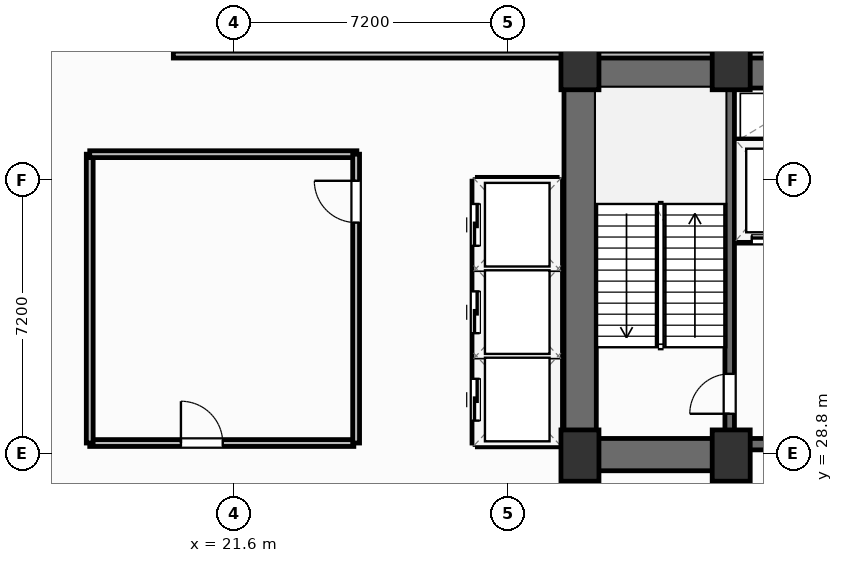
"""IFC4 building model, lengths in metres.
Left out: names, types, materials, properties, quantities, classifications, styles, units other than length and angle.
Written with IfcOpenShell. Run it as: python <this file> out.ifc"""

import sys

from ifc_helpers import new_model, si_unit, direction, frame, frame_2d, origin, origin_2d, place, context, subcontext, project, spatial, rectangle, extrude, element, fill, save


model = new_model("IFC4")
c1 = context("Model", 3, precision=1e-05, world=origin(), true_north=direction((0.0, 1.0)))
c2 = subcontext(c1, "Body", "Model", "MODEL_VIEW")
j1 = project(units=[si_unit("LENGTHUNIT", "METRE"), si_unit("PLANEANGLEUNIT", "RADIAN")], contexts=[c1])
p1 = place(None, origin())
s1 = spatial("IfcSite", under=j1, at=p1, CompositionType="ELEMENT")
p2 = place(p1, origin())
s2 = spatial("IfcBuilding", under=s1, at=p2, CompositionType="ELEMENT")
p3 = place(p2, frame((0.0, 0.0, 71.4)))
s3 = spatial("IfcBuildingStorey", under=s2, at=p3, CompositionType="ELEMENT", Elevation=71.4)
for number, where, z_axis, x_axis in (
    (1, (30.7, 28.75, 0.0), (0.0, 0.0, 1.0), (1.0, 0.0, 0.0)),
    (2, (34.68, 28.75, 0.0), (0.0, 0.0, 1.0), (1.0, 0.0, 0.0)),
    (3, (30.7, 39.05, 0.0), (0.0, 0.0, 1.0), (1.0, 0.0, 0.0)),
    (4, (34.68, 39.05, 0.0), (0.0, 0.0, 1.0), (1.0, 0.0, 0.0)),
):
    element("IfcColumn", number, at=place(p3, frame(where, z_axis=z_axis, x_axis=x_axis)), inside=s3, PredefinedType="COLUMN", context=c2, shape_type="SweptSolid", body=[
        extrude(rectangle(XDim=1.0, YDim=1.35, at=origin_2d()), origin(), (0.0, 0.0, 1.0), 4.8),
    ])
p4 = place(p3, frame((30.28, 38.845, 0.0), z_axis=(0.0, 0.0, 1.0), x_axis=(1.0, 0.0, 0.0)))
e5 = element("IfcWall", 5, at=p4, inside=s3, PredefinedType="SHEAR", context=c2, shape_type="SweptSolid", body=[
    extrude(rectangle(XDim=17.84, YDim=0.85, at=frame_2d((8.92, 0.0))), origin(), (0.0, 0.0, 1.0), 4.55),
])
p5 = place(p3, frame((30.705, 29.2, 0.0), z_axis=(0.0, 0.0, 1.0), x_axis=(0.0, 1.0, 0.0)))
e6 = element("IfcWall", 6, at=p5, inside=s3, PredefinedType="SHEAR", context=c2, shape_type="SweptSolid", body=[
    extrude(rectangle(XDim=9.22, YDim=0.85, at=frame_2d((4.61, 0.0))), origin(), (0.0, 0.0, 1.0), 4.55),
])
p6 = place(p3, frame((30.28, 28.775, 0.0), z_axis=(0.0, 0.0, 1.0), x_axis=(1.0, 0.0, 0.0)))
e7 = element("IfcWall", 7, at=p6, inside=s3, PredefinedType="SHEAR", context=c2, shape_type="SweptSolid", body=[
    extrude(rectangle(XDim=4.52, YDim=0.85, at=frame_2d((2.26, 0.0))), origin(), (0.0, 0.0, 1.0), 4.55),
])
p7 = place(p3, frame((34.8, 29.05, 0.0), z_axis=(0.0, 0.0, 1.0), x_axis=(1.0, 0.0, 0.0)))
e8 = element("IfcWall", 8, at=p7, inside=s3, PredefinedType="SHEAR", context=c2, shape_type="SweptSolid", body=[
    extrude(rectangle(XDim=8.8, YDim=0.3, at=frame_2d((4.4, 0.0))), origin(), (0.0, 0.0, 1.0), 4.55),
])
p8 = place(p7, frame((0.95, 0.0, 0.0)))
e9 = element("IfcOpeningElement", 9, at=p8, cuts=e8, PredefinedType="OPENING", context=c2, shape_type="SweptSolid", body=[
    extrude(rectangle(XDim=1.1, YDim=2.15, at=frame_2d((0.55, 1.075))), frame((0.0, 0.16, 0.0), z_axis=(0.0, -1.0, 0.0), x_axis=(1.0, 0.0, 0.0)), (0.0, 0.0, 1.0), 0.32),
])
p9 = place(p7, frame((6.75, 0.0, 0.0)))
e10 = element("IfcOpeningElement", 10, at=p9, cuts=e8, PredefinedType="OPENING", context=c2, shape_type="SweptSolid", body=[
    extrude(rectangle(XDim=1.1, YDim=2.15, at=frame_2d((0.55, 1.075))), frame((0.0, 0.16, 0.0), z_axis=(0.0, -1.0, 0.0), x_axis=(1.0, 0.0, 0.0)), (0.0, 0.0, 1.0), 0.32),
])
p10 = place(p7, frame((4.45, 0.0, 0.0)))
e11 = element("IfcOpeningElement", 11, at=p10, cuts=e8, PredefinedType="OPENING", context=c2, shape_type="SweptSolid", body=[
    extrude(rectangle(XDim=0.95, YDim=2.15, at=frame_2d((0.475, 1.075))), frame((0.0, 0.16, 0.0), z_axis=(0.0, -1.0, 0.0), x_axis=(1.0, 0.0, 0.0)), (0.0, 0.0, 1.0), 0.32),
])
p11 = place(p3, frame((34.64, 29.2, 0.0), z_axis=(0.0, 0.0, 1.0), x_axis=(0.0, 1.0, 0.0)))
e12 = element("IfcWall", 12, at=p11, inside=s3, PredefinedType="SHEAR", context=c2, shape_type="SweptSolid", body=[
    extrude(rectangle(XDim=9.22, YDim=0.25, at=frame_2d((4.61, 0.0))), origin(), (0.0, 0.0, 1.0), 4.55),
])
p12 = place(p11, frame((0.65, 0.0, 0.0)))
e13 = element("IfcOpeningElement", 13, at=p12, cuts=e12, PredefinedType="OPENING", context=c2, shape_type="SweptSolid", body=[
    extrude(rectangle(XDim=1.05, YDim=2.15, at=frame_2d((0.525, 1.075))), frame((0.0, 0.135, 0.0), z_axis=(0.0, -1.0, 0.0), x_axis=(1.0, 0.0, 0.0)), (0.0, 0.0, 1.0), 0.27),
])
p13 = place(p3, frame((18.646, 55.739, 0.0), z_axis=(0.0, 0.0, 1.0), x_axis=(0.935222250741, -0.354061211825, 0.0)))
e14 = element("IfcWall", 14, at=p13, inside=s3, PredefinedType="SOLIDWALL", context=c2, shape_type="SweptSolid", body=[
    extrude(rectangle(XDim=60.0, YDim=0.22, at=frame_2d((30.0, 0.0))), origin(), (0.0, 0.0, 1.0), 3.83),
])
p14 = place(p13, frame((27.647, 0.0, 0.0)))
e15 = element("IfcOpeningElement", 15, at=p14, cuts=e14, PredefinedType="OPENING", context=c2, shape_type="SweptSolid", body=[
    extrude(rectangle(XDim=1.85, YDim=2.3, at=frame_2d((0.925, 1.15))), frame((0.0, 0.12, 0.0), z_axis=(0.0, -1.0, 0.0), x_axis=(1.0, 0.0, 0.0)), (0.0, 0.0, 1.0), 0.24),
])
p15 = place(p13, frame((0.55, 0.0, 0.75)))
e16 = element("IfcOpeningElement", 16, at=p15, cuts=e14, PredefinedType="OPENING", context=c2, shape_type="SweptSolid", body=[
    extrude(rectangle(XDim=1.65, YDim=1.65, at=frame_2d((0.825, 0.825))), frame((0.0, 0.12, 0.0), z_axis=(0.0, -1.0, 0.0), x_axis=(1.0, 0.0, 0.0)), (0.0, 0.0, 1.0), 0.24),
])
p16 = place(p13, frame((57.8, 0.0, 0.75)))
e17 = element("IfcOpeningElement", 17, at=p16, cuts=e14, PredefinedType="OPENING", context=c2, shape_type="SweptSolid", body=[
    extrude(rectangle(XDim=1.65, YDim=1.65, at=frame_2d((0.825, 0.825))), frame((0.0, 0.12, 0.0), z_axis=(0.0, -1.0, 0.0), x_axis=(1.0, 0.0, 0.0)), (0.0, 0.0, 1.0), 0.24),
])
p17 = place(p3, frame((17.8, 29.08, 0.0), z_axis=(0.0, 0.0, 1.0), x_axis=(1.0, 0.0, 0.0)))
e18 = element("IfcWall", 18, at=p17, inside=s3, PredefinedType="PARTITIONING", context=c2, shape_type="SweptSolid", body=[
    extrude(rectangle(XDim=6.95, YDim=0.18, at=frame_2d((3.475, 0.0))), origin(), (0.0, 0.0, 1.0), 4.55),
])
p18 = place(p17, frame((2.4, 0.0, 0.0)))
e19 = element("IfcOpeningElement", 19, at=p18, cuts=e18, PredefinedType="OPENING", context=c2, shape_type="SweptSolid", body=[
    extrude(rectangle(XDim=1.1, YDim=2.15, at=frame_2d((0.55, 1.075))), frame((0.0, 0.1, 0.0), z_axis=(0.0, -1.0, 0.0), x_axis=(1.0, 0.0, 0.0)), (0.0, 0.0, 1.0), 0.2),
])
p19 = place(p3, frame((17.8, 29.08, 0.0), z_axis=(0.0, 0.0, 1.0), x_axis=(0.0, 1.0, 0.0)))
e20 = element("IfcWall", 20, at=p19, inside=s3, PredefinedType="PARTITIONING", context=c2, shape_type="SweptSolid", body=[
    extrude(rectangle(XDim=7.6, YDim=0.18, at=frame_2d((3.8, 0.0))), origin(), (0.0, 0.0, 1.0), 4.55),
])
p20 = place(p3, frame((17.8, 36.68, 0.0), z_axis=(0.0, 0.0, 1.0), x_axis=(1.0, 0.0, 0.0)))
e21 = element("IfcWall", 21, at=p20, inside=s3, PredefinedType="PARTITIONING", context=c2, shape_type="SweptSolid", body=[
    extrude(rectangle(XDim=7.03, YDim=0.18, at=frame_2d((3.515, 0.0))), origin(), (0.0, 0.0, 1.0), 4.55),
])
p21 = place(p3, frame((24.81, 29.08, 0.0), z_axis=(0.0, 0.0, 1.0), x_axis=(0.0, 1.0, 0.0)))
e22 = element("IfcWall", 22, at=p21, inside=s3, PredefinedType="PARTITIONING", context=c2, shape_type="SweptSolid", body=[
    extrude(rectangle(XDim=7.6, YDim=0.18, at=frame_2d((3.8, 0.0))), origin(), (0.0, 0.0, 1.0), 4.55),
])
p22 = place(p21, frame((5.8, 0.0, 0.0)))
e23 = element("IfcOpeningElement", 23, at=p22, cuts=e22, PredefinedType="OPENING", context=c2, shape_type="SweptSolid", body=[
    extrude(rectangle(XDim=1.1, YDim=2.15, at=frame_2d((0.55, 1.075))), frame((0.0, 0.1, 0.0), z_axis=(0.0, -1.0, 0.0), x_axis=(1.0, 0.0, 0.0)), (0.0, 0.0, 1.0), 0.2),
])
p23 = place(p3, frame((20.0, 39.3, 0.0), z_axis=(0.0, 0.0, 1.0), x_axis=(1.0, 0.0, 0.0)))
e24 = element("IfcWall", 24, at=p23, inside=s3, PredefinedType="PARTITIONING", context=c2, shape_type="SweptSolid", body=[
    extrude(rectangle(XDim=33.3, YDim=0.18, at=frame_2d((16.65, 0.0))), origin(), (0.0, 0.0, 1.0), 3.68),
])
p24 = place(p23, frame((31.1, 0.0, 0.0)))
e25 = element("IfcOpeningElement", 25, at=p24, cuts=e24, PredefinedType="OPENING", context=c2, shape_type="SweptSolid", body=[
    extrude(rectangle(XDim=1.0, YDim=2.05, at=frame_2d((0.5, 1.025))), frame((0.0, 0.1, 0.0), z_axis=(0.0, -1.0, 0.0), x_axis=(1.0, 0.0, 0.0)), (0.0, 0.0, 1.0), 0.2),
])
p25 = place(p3, frame((34.8, 34.44, 0.0), z_axis=(0.0, 0.0, 1.0), x_axis=(1.0, 0.0, 0.0)))
e26 = element("IfcWall", 26, at=p25, inside=s3, PredefinedType="PARTITIONING", context=c2, shape_type="SweptSolid", body=[
    extrude(rectangle(XDim=2.18, YDim=0.2, at=frame_2d((1.09, 0.0))), origin(), (0.0, 0.0, 1.0), 4.55),
])
p26 = place(p25, frame((0.42, 0.0, 0.0)))
e27 = element("IfcOpeningElement", 27, at=p26, cuts=e26, PredefinedType="OPENING", context=c2, shape_type="SweptSolid", body=[
    extrude(rectangle(XDim=1.2, YDim=2.2, at=frame_2d((0.6, 1.1))), frame((0.0, 0.11, 0.0), z_axis=(0.0, -1.0, 0.0), x_axis=(1.0, 0.0, 0.0)), (0.0, 0.0, 1.0), 0.22),
])
p27 = place(p3, frame((34.8, 36.98, 0.0), z_axis=(0.0, 0.0, 1.0), x_axis=(1.0, 0.0, 0.0)))
e28 = element("IfcWall", 28, at=p27, inside=s3, PredefinedType="PARTITIONING", context=c2, shape_type="SweptSolid", body=[
    extrude(rectangle(XDim=2.18, YDim=0.2, at=frame_2d((1.09, 0.0))), origin(), (0.0, 0.0, 1.0), 4.55),
])
for number, where, z_axis, x_axis in (
    (29, (28.02, 31.375, 0.0), (0.0, 0.0, 1.0), (1.0, 0.0, 0.0)),
    (30, (28.02, 33.675, 0.0), (0.0, 0.0, 1.0), (1.0, 0.0, 0.0)),
):
    element("IfcWall", number, at=place(p3, frame(where, z_axis=z_axis, x_axis=x_axis)), inside=s3, PredefinedType="PARTITIONING", context=c2, shape_type="SweptSolid", body=[
        extrude(rectangle(XDim=2.06, YDim=0.2, at=frame_2d((1.03, 0.0))), origin(), (0.0, 0.0, 1.0), 4.55),
    ])
for number, where, z_axis, x_axis in (
    (31, (28.0, 29.08, 0.0), (0.0, 0.0, 1.0), (1.0, 0.0, 0.0)),
    (32, (28.0, 35.97, 0.0), (0.0, 0.0, 1.0), (1.0, 0.0, 0.0)),
):
    element("IfcWall", number, at=place(p3, frame(where, z_axis=z_axis, x_axis=x_axis)), inside=s3, PredefinedType="PARTITIONING", context=c2, shape_type="SweptSolid", body=[
        extrude(rectangle(XDim=2.1, YDim=0.2, at=frame_2d((1.05, 0.0))), origin(), (0.0, 0.0, 1.0), 4.55),
    ])
p28 = place(p3, frame((30.12, 29.08, 0.0), z_axis=(0.0, 0.0, 1.0), x_axis=(0.0, 1.0, 0.0)))
e33 = element("IfcWall", 33, at=p28, inside=s3, PredefinedType="PARTITIONING", context=c2, shape_type="SweptSolid", body=[
    extrude(rectangle(XDim=6.89, YDim=0.2, at=frame_2d((3.445, 0.0))), origin(), (0.0, 0.0, 1.0), 4.55),
])
p29 = place(p3, frame((27.96, 29.08, 0.0), z_axis=(0.0, 0.0, 1.0), x_axis=(0.0, 1.0, 0.0)))
e34 = element("IfcWall", 34, at=p29, inside=s3, PredefinedType="PARTITIONING", context=c2, shape_type="SweptSolid", body=[
    extrude(rectangle(XDim=6.89, YDim=0.2, at=frame_2d((3.445, 0.0))), origin(), (0.0, 0.0, 1.0), 4.55),
])
p30 = place(p29, frame((0.59, 0.0, 0.0)))
e35 = element("IfcOpeningElement", 35, at=p30, cuts=e34, PredefinedType="OPENING", context=c2, shape_type="SweptSolid", body=[
    extrude(rectangle(XDim=1.1, YDim=2.15, at=frame_2d((0.55, 1.075))), frame((0.0, 0.11, 0.0), z_axis=(0.0, -1.0, 0.0), x_axis=(1.0, 0.0, 0.0)), (0.0, 0.0, 1.0), 0.22),
])
p31 = place(p29, frame((2.89, 0.0, 0.0)))
e36 = element("IfcOpeningElement", 36, at=p31, cuts=e34, PredefinedType="OPENING", context=c2, shape_type="SweptSolid", body=[
    extrude(rectangle(XDim=1.1, YDim=2.15, at=frame_2d((0.55, 1.075))), frame((0.0, 0.11, 0.0), z_axis=(0.0, -1.0, 0.0), x_axis=(1.0, 0.0, 0.0)), (0.0, 0.0, 1.0), 0.22),
])
p32 = place(p29, frame((5.19, 0.0, 0.0)))
e37 = element("IfcOpeningElement", 37, at=p32, cuts=e34, PredefinedType="OPENING", context=c2, shape_type="SweptSolid", body=[
    extrude(rectangle(XDim=1.1, YDim=2.15, at=frame_2d((0.55, 1.075))), frame((0.0, 0.11, 0.0), z_axis=(0.0, -1.0, 0.0), x_axis=(1.0, 0.0, 0.0)), (0.0, 0.0, 1.0), 0.22),
])
p33 = place(p18, origin())
e38 = element("IfcDoor", 38, at=p33, inside=s3, OperationType="SINGLE_SWING_LEFT", PredefinedType="DOOR", context=c2, shape_type="SweptSolid", body=[
    extrude(rectangle(XDim=1.1, YDim=2.15, at=frame_2d((0.55, 1.075))), frame((0.0, 0.025, 0.0), z_axis=(0.0, -1.0, 0.0), x_axis=(1.0, 0.0, 0.0)), (0.0, 0.0, 1.0), 0.05),
])
fill(e19, e38)
p34 = place(p22, origin())
e39 = element("IfcDoor", 39, at=p34, inside=s3, OperationType="SINGLE_SWING_RIGHT", PredefinedType="DOOR", context=c2, shape_type="SweptSolid", body=[
    extrude(rectangle(XDim=1.1, YDim=2.15, at=frame_2d((0.55, 1.075))), frame((0.0, 0.025, 0.0), z_axis=(0.0, -1.0, 0.0), x_axis=(1.0, 0.0, 0.0)), (0.0, 0.0, 1.0), 0.05),
])
fill(e23, e39)
p35 = place(p12, origin())
e40 = element("IfcDoor", 40, at=p35, inside=s3, OperationType="SINGLE_SWING_LEFT", PredefinedType="DOOR", context=c2, shape_type="SweptSolid", body=[
    extrude(rectangle(XDim=1.05, YDim=2.15, at=frame_2d((0.525, 1.075))), frame((0.0, 0.025, 0.0), z_axis=(0.0, -1.0, 0.0), x_axis=(1.0, 0.0, 0.0)), (0.0, 0.0, 1.0), 0.05),
])
fill(e13, e40)
p36 = place(p26, origin())
e41 = element("IfcDoor", 41, at=p36, inside=s3, OperationType="SLIDING_TO_LEFT", PredefinedType="DOOR", context=c2, shape_type="SweptSolid", body=[
    extrude(rectangle(XDim=1.2, YDim=2.2, at=frame_2d((0.6, 1.1))), frame((0.0, 0.025, 0.0), z_axis=(0.0, -1.0, 0.0), x_axis=(1.0, 0.0, 0.0)), (0.0, 0.0, 1.0), 0.05),
])
fill(e27, e41)
p37 = place(p30, origin())
e42 = element("IfcDoor", 42, at=p37, inside=s3, OperationType="SLIDING_TO_LEFT", PredefinedType="DOOR", context=c2, shape_type="SweptSolid", body=[
    extrude(rectangle(XDim=1.1, YDim=2.15, at=frame_2d((0.55, 1.075))), frame((0.0, 0.025, 0.0), z_axis=(0.0, -1.0, 0.0), x_axis=(1.0, 0.0, 0.0)), (0.0, 0.0, 1.0), 0.05),
])
fill(e35, e42)
p38 = place(p31, origin())
e43 = element("IfcDoor", 43, at=p38, inside=s3, OperationType="SLIDING_TO_LEFT", PredefinedType="DOOR", context=c2, shape_type="SweptSolid", body=[
    extrude(rectangle(XDim=1.1, YDim=2.15, at=frame_2d((0.55, 1.075))), frame((0.0, 0.025, 0.0), z_axis=(0.0, -1.0, 0.0), x_axis=(1.0, 0.0, 0.0)), (0.0, 0.0, 1.0), 0.05),
])
fill(e36, e43)
p39 = place(p32, origin())
e44 = element("IfcDoor", 44, at=p39, inside=s3, OperationType="SLIDING_TO_LEFT", PredefinedType="DOOR", context=c2, shape_type="SweptSolid", body=[
    extrude(rectangle(XDim=1.1, YDim=2.15, at=frame_2d((0.55, 1.075))), frame((0.0, 0.025, 0.0), z_axis=(0.0, -1.0, 0.0), x_axis=(1.0, 0.0, 0.0)), (0.0, 0.0, 1.0), 0.05),
])
fill(e37, e44)
save(model, sys.argv[1])
